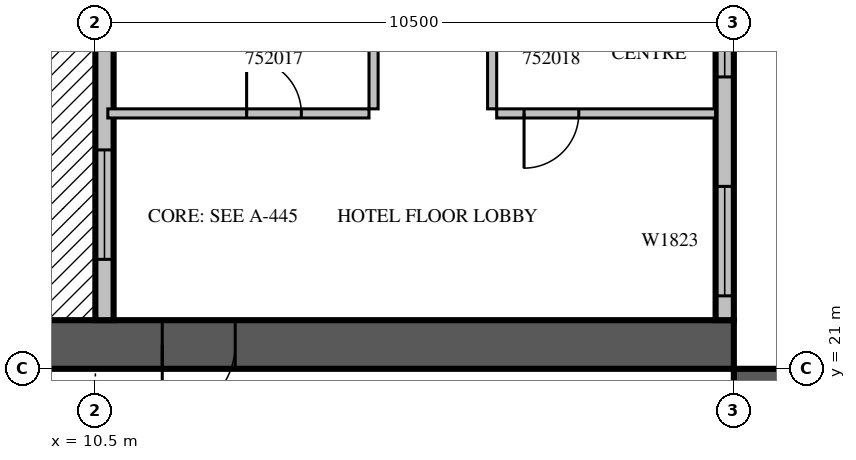
"""IFC4 building model, lengths in metres.
Left out: names, types, materials, properties, quantities, classifications, styles, units other than length and angle.
Written with IfcOpenShell. Run it as: python <this file> out.ifc"""

import sys

from ifc_helpers import new_model, si_unit, direction, frame, frame_2d, origin, place, context, subcontext, project, spatial, rectangle, extrude, source, transform, mapped, element, fill, save


model = new_model("IFC4")
c1 = context("Model", 3, precision=1e-05, world=origin(), true_north=direction((0.0, 1.0)))
c2 = subcontext(c1, "Body", "Model", "MODEL_VIEW")
j1 = project(units=[si_unit("LENGTHUNIT", "METRE"), si_unit("PLANEANGLEUNIT", "RADIAN")], contexts=[c1])
p1 = place(None, origin())
s1 = spatial("IfcSite", under=j1, at=p1, CompositionType="ELEMENT")
p2 = place(p1, origin())
s2 = spatial("IfcBuilding", under=s1, at=p2, CompositionType="ELEMENT")
p3 = place(p2, frame((0.0, 0.0, 231.0)))
s3 = spatial("IfcBuildingStorey", under=s2, at=p3, CompositionType="ELEMENT", Elevation=231.0)
m1 = source(origin(), c2, "Body", "SweptSolid", [
    extrude(rectangle(XDim=16.8, YDim=0.8, at=frame_2d((8.4, 0.0))), origin(), (0.0, 0.0, 1.0), 3.8),
])
p4 = place(p3, frame((21.4, 4.2, 0.0), z_axis=(0.0, 0.0, 1.0), x_axis=(0.0, 1.0, 0.0)))
e1 = element("IfcWall", 1, at=p4, inside=s3, PredefinedType="SHEAR", context=c2, shape_type="MappedRepresentation", body=[
    mapped(m1, transform((0.0, 0.0, 0.0), scale=1.0)),
])
m2 = source(origin(), c2, "Body", "SweptSolid", [
    extrude(rectangle(XDim=2.2, YDim=2.1, at=frame_2d((1.1, 1.05))), frame((0.0, 0.41, 0.0), z_axis=(0.0, -1.0, 0.0), x_axis=(1.0, 0.0, 0.0)), (0.0, 0.0, 1.0), 0.82),
])
p5 = place(p4, frame((4.2, 0.0, 0.0)))
e2 = element("IfcOpeningElement", 2, at=p5, cuts=e1, PredefinedType="OPENING", context=c2, shape_type="MappedRepresentation", body=[
    mapped(m2, transform((0.0, 0.0, 0.0), scale=1.0)),
])
m3 = source(origin(), c2, "Body", "SweptSolid", [
    extrude(rectangle(XDim=1.2, YDim=2.1, at=frame_2d((0.6, 1.05))), frame((0.0, 0.41, 0.0), z_axis=(0.0, -1.0, 0.0), x_axis=(1.0, 0.0, 0.0)), (0.0, 0.0, 1.0), 0.82),
])
p6 = place(p4, frame((14.7, 0.0, 0.0)))
e3 = element("IfcOpeningElement", 3, at=p6, cuts=e1, PredefinedType="OPENING", context=c2, shape_type="MappedRepresentation", body=[
    mapped(m3, transform((0.0, 0.0, 0.0), scale=1.0)),
])
p7 = place(p3, frame((4.2, 21.4, 0.0), z_axis=(0.0, 0.0, 1.0), x_axis=(1.0, 0.0, 0.0)))
e4 = element("IfcWall", 4, at=p7, inside=s3, PredefinedType="SHEAR", context=c2, shape_type="MappedRepresentation", body=[
    mapped(m1, transform((0.0, 0.0, 0.0), scale=1.0)),
])
p8 = place(p7, frame((7.4, 0.0, 0.0)))
e5 = element("IfcOpeningElement", 5, at=p8, cuts=e4, PredefinedType="OPENING", context=c2, shape_type="MappedRepresentation", body=[
    mapped(m3, transform((0.0, 0.0, 0.0), scale=1.0)),
])
m4 = source(origin(), c2, "Body", "SweptSolid", [
    extrude(rectangle(XDim=7.2, YDim=0.3, at=frame_2d((3.6, 0.0))), origin(), (0.0, 0.0, 1.0), 3.4),
])
p9 = place(p3, frame((20.85, 21.8, 0.0), z_axis=(0.0, 0.0, 1.0), x_axis=(0.0, 1.0, 0.0)))
e6 = element("IfcWall", 6, at=p9, inside=s3, PredefinedType="STANDARD", context=c2, shape_type="MappedRepresentation", body=[
    mapped(m4, transform((0.0, 0.0, 0.0), scale=1.0)),
])
m5 = source(origin(), c2, "Body", "SweptSolid", [
    extrude(rectangle(XDim=1.8, YDim=2.3, at=frame_2d((0.9, 1.15))), frame((0.0, 0.16, 0.0), z_axis=(0.0, -1.0, 0.0), x_axis=(1.0, 0.0, 0.0)), (0.0, 0.0, 1.0), 0.32),
])
p10 = place(p9, frame((0.4, 0.0, 0.6)))
e7 = element("IfcOpeningElement", 7, at=p10, cuts=e6, PredefinedType="OPENING", context=c2, shape_type="MappedRepresentation", body=[
    mapped(m5, transform((0.0, 0.0, 0.0), scale=1.0)),
])
m6 = source(origin(), c2, "Body", "SweptSolid", [
    extrude(rectangle(XDim=3.0, YDim=2.3, at=frame_2d((1.5, 1.15))), frame((0.0, 0.16, 0.0), z_axis=(0.0, -1.0, 0.0), x_axis=(1.0, 0.0, 0.0)), (0.0, 0.0, 1.0), 0.32),
])
p11 = place(p9, frame((4.0, 0.0, 0.6)))
e8 = element("IfcOpeningElement", 8, at=p11, cuts=e6, PredefinedType="OPENING", context=c2, shape_type="MappedRepresentation", body=[
    mapped(m6, transform((0.0, 0.0, 0.0), scale=1.0)),
])
p12 = place(p3, frame((10.65, 29.0, 0.0), z_axis=(0.0, 0.0, 1.0), x_axis=(0.0, -1.0, 0.0)))
e9 = element("IfcWall", 9, at=p12, inside=s3, PredefinedType="STANDARD", context=c2, shape_type="MappedRepresentation", body=[
    mapped(m4, transform((0.0, 0.0, 0.0), scale=1.0)),
])
m7 = source(origin(), c2, "Body", "SweptSolid", [
    extrude(rectangle(XDim=1.8, YDim=2.4, at=frame_2d((0.9, 1.2))), frame((0.0, 0.16, 0.0), z_axis=(0.0, -1.0, 0.0), x_axis=(1.0, 0.0, 0.0)), (0.0, 0.0, 1.0), 0.32),
])
p13 = place(p12, frame((0.2, 0.0, 0.0)))
e10 = element("IfcOpeningElement", 10, at=p13, cuts=e9, PredefinedType="OPENING", context=c2, shape_type="MappedRepresentation", body=[
    mapped(m7, transform((0.0, 0.0, 0.0), scale=1.0)),
])
p14 = place(p12, frame((4.4, 0.0, 0.0)))
e11 = element("IfcOpeningElement", 11, at=p14, cuts=e9, PredefinedType="OPENING", context=c2, shape_type="MappedRepresentation", body=[
    mapped(m7, transform((0.0, 0.0, 0.0), scale=1.0)),
])
m8 = source(origin(), c2, "Body", "SweptSolid", [
    extrude(rectangle(XDim=4.295, YDim=0.15, at=frame_2d((2.147, 0.0))), origin(), (0.0, 0.0, 1.0), 3.4),
])
p15 = place(p3, frame((10.705, 25.2, 0.0), z_axis=(0.0, 0.0, 1.0), x_axis=(1.0, 0.0, 0.0)))
e12 = element("IfcWall", 12, at=p15, inside=s3, PredefinedType="PARTITIONING", context=c2, shape_type="MappedRepresentation", body=[
    mapped(m8, transform((0.0, 0.0, 0.0), scale=1.0)),
])
m9 = source(origin(), c2, "Body", "SweptSolid", [
    extrude(rectangle(XDim=0.9, YDim=2.1, at=frame_2d((0.45, 1.05))), frame((0.0, 0.085, 0.0), z_axis=(0.0, -1.0, 0.0), x_axis=(1.0, 0.0, 0.0)), (0.0, 0.0, 1.0), 0.17),
])
p16 = place(p15, frame((2.283, 0.0, 0.0)))
e13 = element("IfcOpeningElement", 13, at=p16, cuts=e12, PredefinedType="OPENING", context=c2, shape_type="MappedRepresentation", body=[
    mapped(m9, transform((0.0, 0.0, 0.0), scale=1.0)),
])
m10 = source(origin(), c2, "Body", "SweptSolid", [
    extrude(rectangle(XDim=3.6, YDim=0.15, at=frame_2d((1.8, 0.0))), origin(), (0.0, 0.0, 1.0), 3.4),
])
p17 = place(p3, frame((17.1, 25.2, 0.0), z_axis=(0.0, 0.0, 1.0), x_axis=(1.0, 0.0, 0.0)))
e14 = element("IfcWall", 14, at=p17, inside=s3, PredefinedType="PARTITIONING", context=c2, shape_type="MappedRepresentation", body=[
    mapped(m10, transform((0.0, 0.0, 0.0), scale=1.0)),
])
p18 = place(p17, frame((0.45, 0.0, 0.0)))
e15 = element("IfcOpeningElement", 15, at=p18, cuts=e14, PredefinedType="OPENING", context=c2, shape_type="MappedRepresentation", body=[
    mapped(m9, transform((0.0, 0.0, 0.0), scale=1.0)),
])
m11 = source(origin(), c2, "Body", "SweptSolid", [
    extrude(rectangle(XDim=4.05, YDim=0.15, at=frame_2d((2.025, 0.0))), origin(), (0.0, 0.0, 1.0), 3.4),
])
for number, where, z_axis, x_axis in (
    (16, (15.075, 25.275, 0.0), (0.0, 0.0, 1.0), (0.0, 1.0, 0.0)),
    (17, (17.025, 29.325, 0.0), (0.0, 0.0, 1.0), (0.0, -1.0, 0.0)),
):
    element("IfcWall", number, at=place(p3, frame(where, z_axis=z_axis, x_axis=x_axis)), inside=s3, PredefinedType="PARTITIONING", context=c2, shape_type="MappedRepresentation", body=[
        mapped(m11, transform((0.0, 0.0, 0.0), scale=1.0)),
    ])
m12 = source(origin(), c2, "Body", "SweptSolid", [
    extrude(rectangle(XDim=1.8, YDim=2.3, at=frame_2d((0.9, 1.15))), frame((0.0, 0.03, 0.0), z_axis=(0.0, -1.0, 0.0), x_axis=(1.0, 0.0, 0.0)), (0.0, 0.0, 1.0), 0.06),
])
p19 = place(p10, origin())
e18 = element("IfcWindow", 18, at=p19, inside=s3, PartitioningType="SINGLE_PANEL", PredefinedType="WINDOW", context=c2, shape_type="MappedRepresentation", body=[
    mapped(m12, transform((0.0, 0.0, 0.0), scale=1.0)),
])
fill(e7, e18)
m13 = source(origin(), c2, "Body", "SweptSolid", [
    extrude(rectangle(XDim=3.0, YDim=2.3, at=frame_2d((1.5, 1.15))), frame((0.0, 0.03, 0.0), z_axis=(0.0, -1.0, 0.0), x_axis=(1.0, 0.0, 0.0)), (0.0, 0.0, 1.0), 0.06),
])
p20 = place(p11, origin())
e19 = element("IfcWindow", 19, at=p20, inside=s3, PartitioningType="SINGLE_PANEL", PredefinedType="WINDOW", context=c2, shape_type="MappedRepresentation", body=[
    mapped(m13, transform((0.0, 0.0, 0.0), scale=1.0)),
])
fill(e8, e19)
m14 = source(origin(), c2, "Body", "SweptSolid", [
    extrude(rectangle(XDim=1.8, YDim=2.4, at=frame_2d((0.9, 1.2))), frame((0.0, 0.025, 0.0), z_axis=(0.0, -1.0, 0.0), x_axis=(1.0, 0.0, 0.0)), (0.0, 0.0, 1.0), 0.05),
])
p21 = place(p14, origin())
e20 = element("IfcDoor", 20, at=p21, inside=s3, OperationType="SLIDING_TO_LEFT", PredefinedType="DOOR", context=c2, shape_type="MappedRepresentation", body=[
    mapped(m14, transform((0.0, 0.0, 0.0), scale=1.0)),
])
fill(e11, e20)
m15 = source(origin(), c2, "Body", "SweptSolid", [
    extrude(rectangle(XDim=1.2, YDim=2.1, at=frame_2d((0.6, 1.05))), frame((0.0, 0.025, 0.0), z_axis=(0.0, -1.0, 0.0), x_axis=(1.0, 0.0, 0.0)), (0.0, 0.0, 1.0), 0.05),
])
p22 = place(p8, origin())
e21 = element("IfcDoor", 21, at=p22, inside=s3, OperationType="SINGLE_SWING_RIGHT", PredefinedType="DOOR", context=c2, shape_type="MappedRepresentation", body=[
    mapped(m15, transform((0.0, 0.0, 0.0), scale=1.0)),
])
fill(e5, e21)
m16 = source(origin(), c2, "Body", "SweptSolid", [
    extrude(rectangle(XDim=0.9, YDim=2.1, at=frame_2d((0.45, 1.05))), frame((0.0, 0.025, 0.0), z_axis=(0.0, -1.0, 0.0), x_axis=(1.0, 0.0, 0.0)), (0.0, 0.0, 1.0), 0.05),
])
p23 = place(p16, origin())
e22 = element("IfcDoor", 22, at=p23, inside=s3, OperationType="SINGLE_SWING_LEFT", PredefinedType="DOOR", context=c2, shape_type="MappedRepresentation", body=[
    mapped(m16, transform((0.0, 0.0, 0.0), scale=1.0)),
])
fill(e13, e22)
p24 = place(p18, origin())
e23 = element("IfcDoor", 23, at=p24, inside=s3, OperationType="SINGLE_SWING_RIGHT", PredefinedType="DOOR", context=c2, shape_type="MappedRepresentation", body=[
    mapped(m16, transform((0.0, 0.0, 0.0), scale=1.0)),
])
fill(e15, e23)
save(model, sys.argv[1])
